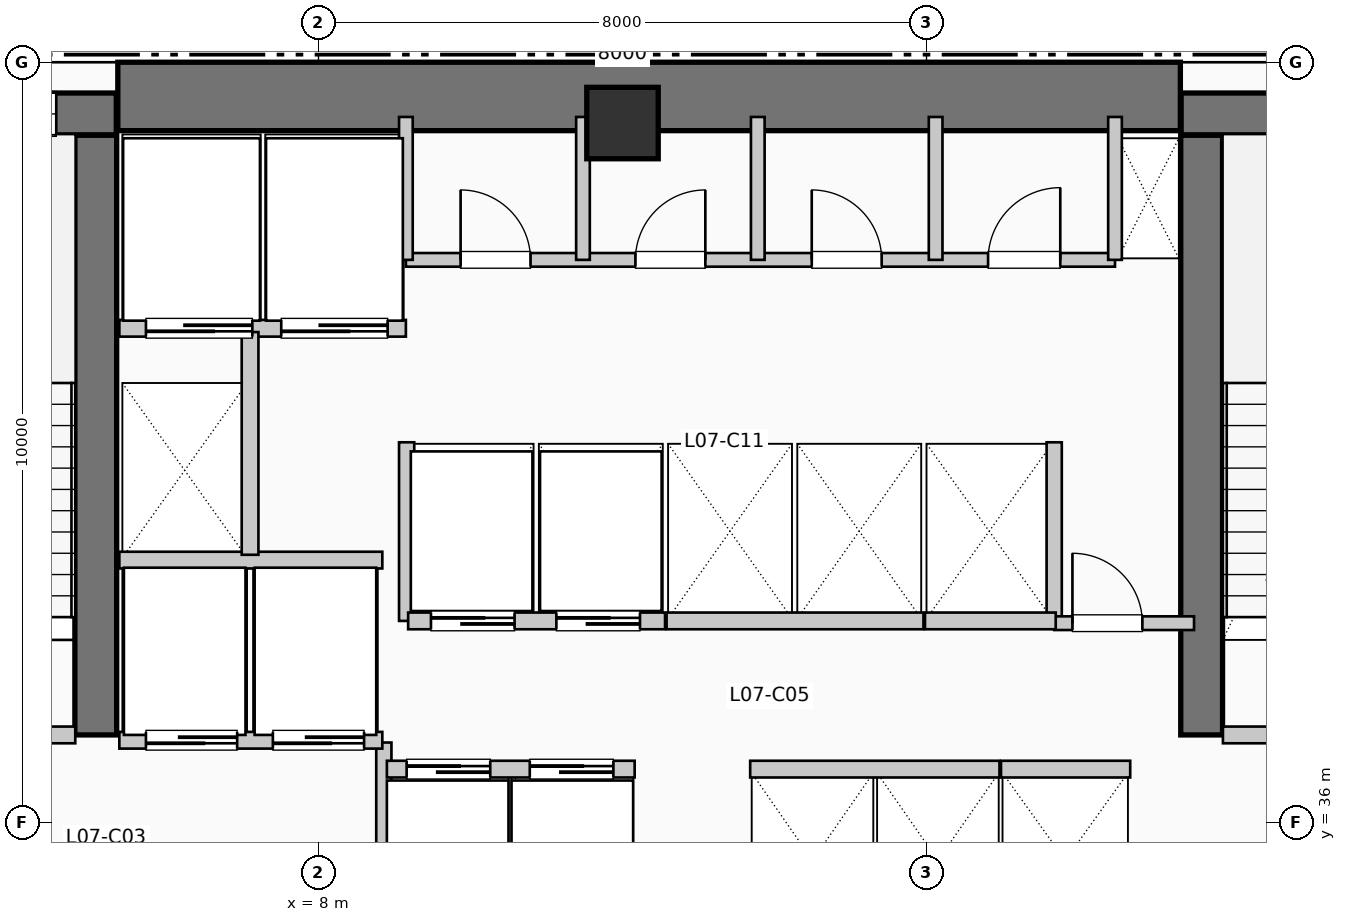
"""IFC4 building model, lengths in metres.
Left out: names, types, materials, properties, quantities, classifications, styles, units other than length and angle.
Written with IfcOpenShell. Run it as: python <this file> out.ifc"""

import sys

from ifc_helpers import new_model, si_unit, direction, frame, frame_2d, origin, origin_2d, place, context, subcontext, project, spatial, rectangle, extrude, element, fill, save


model = new_model("IFC4")
c1 = context("Model", 3, precision=1e-05, world=origin(), true_north=direction((0.0, 1.0)))
c2 = subcontext(c1, "Body", "Model", "MODEL_VIEW")
j1 = project(units=[si_unit("LENGTHUNIT", "METRE"), si_unit("PLANEANGLEUNIT", "RADIAN")], contexts=[c1])
p1 = place(None, origin())
s1 = spatial("IfcSite", under=j1, at=p1, CompositionType="ELEMENT")
p2 = place(p1, origin())
s2 = spatial("IfcBuilding", under=s1, at=p2, CompositionType="ELEMENT")
p3 = place(p2, frame((0.0, 0.0, 34.32)))
s3 = spatial("IfcBuildingStorey", under=s2, at=p3, CompositionType="ELEMENT", Elevation=34.32)
p4 = place(p3, frame((5.36, 45.55, 0.0), z_axis=(0.0, 0.0, 1.0), x_axis=(1.0, 0.0, 0.0)))
e1 = element("IfcWall", 1, at=p4, inside=s3, PredefinedType="SHEAR", context=c2, shape_type="SweptSolid", body=[
    extrude(rectangle(XDim=13.98, YDim=0.9, at=frame_2d((6.99, 0.0))), origin(), (0.0, 0.0, 1.0), 3.96),
])
p5 = place(p3, frame((5.07, 37.15, 0.0), z_axis=(0.0, 0.0, 1.0), x_axis=(0.0, 1.0, 0.0)))
e2 = element("IfcWall", 2, at=p5, inside=s3, PredefinedType="SHEAR", context=c2, shape_type="SweptSolid", body=[
    extrude(rectangle(XDim=7.89, YDim=0.55, at=frame_2d((3.945, 0.0))), origin(), (0.0, 0.0, 1.0), 3.96),
])
p6 = place(p3, frame((1.1, 45.32, 0.0), z_axis=(0.0, 0.0, 1.0), x_axis=(1.0, 0.0, 0.0)))
e3 = element("IfcWall", 3, at=p6, inside=s3, PredefinedType="SHEAR", context=c2, shape_type="SweptSolid", body=[
    extrude(rectangle(XDim=4.24, YDim=0.55, at=frame_2d((2.12, 0.0))), origin(), (0.0, 0.0, 1.0), 3.96),
])
p7 = place(p6, frame((2.05, 0.0, 1.05)))
e4 = element("IfcOpeningElement", 4, at=p7, cuts=e3, PredefinedType="OPENING", context=c2, shape_type="SweptSolid", body=[
    extrude(rectangle(XDim=1.4, YDim=1.8, at=frame_2d((0.7, 0.9))), frame((0.0, 0.285, 0.0), z_axis=(0.0, -1.0, 0.0), x_axis=(1.0, 0.0, 0.0)), (0.0, 0.0, 1.0), 0.57),
])
p8 = place(p3, frame((19.62, 37.15, 0.0), z_axis=(0.0, 0.0, 1.0), x_axis=(0.0, 1.0, 0.0)))
e5 = element("IfcWall", 5, at=p8, inside=s3, PredefinedType="SHEAR", context=c2, shape_type="SweptSolid", body=[
    extrude(rectangle(XDim=7.89, YDim=0.55, at=frame_2d((3.945, 0.0))), origin(), (0.0, 0.0, 1.0), 3.96),
])
p9 = place(p3, frame((19.35, 45.32, 0.0), z_axis=(0.0, 0.0, 1.0), x_axis=(1.0, 0.0, 0.0)))
e6 = element("IfcWall", 6, at=p9, inside=s3, PredefinedType="SHEAR", context=c2, shape_type="SweptSolid", body=[
    extrude(rectangle(XDim=3.69, YDim=0.55, at=frame_2d((1.845, 0.0))), origin(), (0.0, 0.0, 1.0), 3.96),
])
p10 = place(p9, frame((1.15, 0.0, 1.05)))
e7 = element("IfcOpeningElement", 7, at=p10, cuts=e6, PredefinedType="OPENING", context=c2, shape_type="SweptSolid", body=[
    extrude(rectangle(XDim=1.4, YDim=1.8, at=frame_2d((0.7, 0.9))), frame((0.0, 0.285, 0.0), z_axis=(0.0, -1.0, 0.0), x_axis=(1.0, 0.0, 0.0)), (0.0, 0.0, 1.0), 0.57),
])
p11 = place(p3, frame((12.0, 45.2, 0.0), z_axis=(0.0, 0.0, 1.0), x_axis=(1.0, 0.0, 0.0)))
e8 = element("IfcColumn", 8, at=p11, inside=s3, PredefinedType="COLUMN", context=c2, shape_type="SweptSolid", body=[
    extrude(rectangle(XDim=0.94, YDim=0.94, at=origin_2d()), origin(), (0.0, 0.0, 1.0), 3.96),
])
p12 = place(p3, frame((1.65, 37.15, 0.0), z_axis=(0.0, 0.0, 1.0), x_axis=(1.0, 0.0, 0.0)))
e9 = element("IfcWall", 9, at=p12, inside=s3, PredefinedType="PARTITIONING", context=c2, shape_type="SweptSolid", body=[
    extrude(rectangle(XDim=3.15, YDim=0.22, at=frame_2d((1.575, 0.0))), origin(), (0.0, 0.0, 1.0), 3.71),
])
p13 = place(p12, frame((2.05, 0.0, 0.0), z_axis=(0.0, 0.0, 1.0), x_axis=(-1.0, 0.0, 0.0)))
e10 = element("IfcOpeningElement", 10, at=p13, cuts=e9, PredefinedType="OPENING", context=c2, shape_type="SweptSolid", body=[
    extrude(rectangle(XDim=1.05, YDim=2.15, at=frame_2d((0.525, 1.075))), frame((0.0, 0.12, 0.0), z_axis=(0.0, -1.0, 0.0), x_axis=(1.0, 0.0, 0.0)), (0.0, 0.0, 1.0), 0.24),
])
p14 = place(p3, frame((8.86, 34.55, 0.0), z_axis=(0.0, 0.0, 1.0), x_axis=(0.0, 1.0, 0.0)))
e11 = element("IfcWall", 11, at=p14, inside=s3, PredefinedType="PARTITIONING", context=c2, shape_type="SweptSolid", body=[
    extrude(rectangle(XDim=2.5, YDim=0.2, at=frame_2d((1.25, 0.0))), origin(), (0.0, 0.0, 1.0), 3.71),
])
p15 = place(p3, frame((19.9, 37.15, 0.0), z_axis=(0.0, 0.0, 1.0), x_axis=(1.0, 0.0, 0.0)))
e12 = element("IfcWall", 12, at=p15, inside=s3, PredefinedType="PARTITIONING", context=c2, shape_type="SweptSolid", body=[
    extrude(rectangle(XDim=3.15, YDim=0.22, at=frame_2d((1.575, 0.0))), origin(), (0.0, 0.0, 1.0), 3.71),
])
p16 = place(p15, frame((2.05, 0.0, 0.0), z_axis=(0.0, 0.0, 1.0), x_axis=(-1.0, 0.0, 0.0)))
e13 = element("IfcOpeningElement", 13, at=p16, cuts=e12, PredefinedType="OPENING", context=c2, shape_type="SweptSolid", body=[
    extrude(rectangle(XDim=1.05, YDim=2.15, at=frame_2d((0.525, 1.075))), frame((0.0, 0.12, 0.0), z_axis=(0.0, -1.0, 0.0), x_axis=(1.0, 0.0, 0.0)), (0.0, 0.0, 1.0), 0.24),
])
p17 = place(p3, frame((5.38, 37.08, 0.0), z_axis=(0.0, 0.0, 1.0), x_axis=(1.0, 0.0, 0.0)))
e14 = element("IfcWall", 14, at=p17, inside=s3, PredefinedType="PARTITIONING", context=c2, shape_type="SweptSolid", body=[
    extrude(rectangle(XDim=3.46, YDim=0.22, at=frame_2d((1.73, 0.0))), origin(), (0.0, 0.0, 1.0), 3.71),
])
p18 = place(p17, frame((1.55, 0.0, 0.0), z_axis=(0.0, 0.0, 1.0), x_axis=(-1.0, 0.0, 0.0)))
e15 = element("IfcOpeningElement", 15, at=p18, cuts=e14, PredefinedType="OPENING", context=c2, shape_type="SweptSolid", body=[
    extrude(rectangle(XDim=1.2, YDim=2.2, at=frame_2d((0.6, 1.1))), frame((0.0, 0.12, 0.0), z_axis=(0.0, -1.0, 0.0), x_axis=(1.0, 0.0, 0.0)), (0.0, 0.0, 1.0), 0.24),
])
p19 = place(p17, frame((3.22, 0.0, 0.0), z_axis=(0.0, 0.0, 1.0), x_axis=(-1.0, 0.0, 0.0)))
e16 = element("IfcOpeningElement", 16, at=p19, cuts=e14, PredefinedType="OPENING", context=c2, shape_type="SweptSolid", body=[
    extrude(rectangle(XDim=1.2, YDim=2.2, at=frame_2d((0.6, 1.1))), frame((0.0, 0.12, 0.0), z_axis=(0.0, -1.0, 0.0), x_axis=(1.0, 0.0, 0.0)), (0.0, 0.0, 1.0), 0.24),
])
p20 = place(p3, frame((5.38, 39.45, 0.0), z_axis=(0.0, 0.0, 1.0), x_axis=(1.0, 0.0, 0.0)))
e17 = element("IfcWall", 17, at=p20, inside=s3, PredefinedType="PARTITIONING", context=c2, shape_type="SweptSolid", body=[
    extrude(rectangle(XDim=3.46, YDim=0.22, at=frame_2d((1.73, 0.0))), origin(), (0.0, 0.0, 1.0), 3.71),
])
p21 = place(p3, frame((5.38, 42.5, 0.0), z_axis=(0.0, 0.0, 1.0), x_axis=(1.0, 0.0, 0.0)))
e18 = element("IfcWall", 18, at=p21, inside=s3, PredefinedType="PARTITIONING", context=c2, shape_type="SweptSolid", body=[
    extrude(rectangle(XDim=3.77, YDim=0.22, at=frame_2d((1.885, 0.0))), origin(), (0.0, 0.0, 1.0), 3.71),
])
p22 = place(p21, frame((1.75, 0.0, 0.0), z_axis=(0.0, 0.0, 1.0), x_axis=(-1.0, 0.0, 0.0)))
e19 = element("IfcOpeningElement", 19, at=p22, cuts=e18, PredefinedType="OPENING", context=c2, shape_type="SweptSolid", body=[
    extrude(rectangle(XDim=1.4, YDim=2.2, at=frame_2d((0.7, 1.1))), frame((0.0, 0.12, 0.0), z_axis=(0.0, -1.0, 0.0), x_axis=(1.0, 0.0, 0.0)), (0.0, 0.0, 1.0), 0.24),
])
p23 = place(p21, frame((3.53, 0.0, 0.0), z_axis=(0.0, 0.0, 1.0), x_axis=(-1.0, 0.0, 0.0)))
e20 = element("IfcOpeningElement", 20, at=p23, cuts=e18, PredefinedType="OPENING", context=c2, shape_type="SweptSolid", body=[
    extrude(rectangle(XDim=1.4, YDim=2.2, at=frame_2d((0.7, 1.1))), frame((0.0, 0.12, 0.0), z_axis=(0.0, -1.0, 0.0), x_axis=(1.0, 0.0, 0.0)), (0.0, 0.0, 1.0), 0.24),
])
p24 = place(p3, frame((7.1, 39.52, 0.0), z_axis=(0.0, 0.0, 1.0), x_axis=(0.0, 1.0, 0.0)))
e21 = element("IfcWall", 21, at=p24, inside=s3, PredefinedType="PARTITIONING", context=c2, shape_type="SweptSolid", body=[
    extrude(rectangle(XDim=2.93, YDim=0.22, at=frame_2d((1.465, 0.0))), origin(), (0.0, 0.0, 1.0), 3.71),
])
for number, where, z_axis, x_axis in (
    (22, (9.16, 38.65, 0.0), (0.0, 0.0, 1.0), (0.0, 1.0, 0.0)),
    (23, (17.68, 38.65, 0.0), (0.0, 0.0, 1.0), (0.0, 1.0, 0.0)),
):
    element("IfcWall", number, at=place(p3, frame(where, z_axis=z_axis, x_axis=x_axis)), inside=s3, PredefinedType="PARTITIONING", context=c2, shape_type="SweptSolid", body=[
        extrude(rectangle(XDim=2.35, YDim=0.2, at=frame_2d((1.175, 0.0))), origin(), (0.0, 0.0, 1.0), 3.71),
    ])
p25 = place(p3, frame((17.68, 38.62, 0.0), z_axis=(0.0, 0.0, 1.0), x_axis=(1.0, 0.0, 0.0)))
e24 = element("IfcWall", 24, at=p25, inside=s3, PredefinedType="PARTITIONING", context=c2, shape_type="SweptSolid", body=[
    extrude(rectangle(XDim=1.84, YDim=0.18, at=frame_2d((0.92, 0.0))), origin(), (0.0, 0.0, 1.0), 3.71),
])
p26 = place(p25, frame((0.24, 0.0, 0.0)))
e25 = element("IfcOpeningElement", 25, at=p26, cuts=e24, PredefinedType="OPENING", context=c2, shape_type="SweptSolid", body=[
    extrude(rectangle(XDim=0.92, YDim=2.1, at=frame_2d((0.46, 1.05))), frame((0.0, 0.1, 0.0), z_axis=(0.0, -1.0, 0.0), x_axis=(1.0, 0.0, 0.0)), (0.0, 0.0, 1.0), 0.2),
])
p27 = place(p3, frame((8.9, 36.7, 0.0), z_axis=(0.0, 0.0, 1.0), x_axis=(1.0, 0.0, 0.0)))
e26 = element("IfcWall", 26, at=p27, inside=s3, PredefinedType="PARTITIONING", context=c2, shape_type="SweptSolid", body=[
    extrude(rectangle(XDim=3.26, YDim=0.22, at=frame_2d((1.63, 0.0))), origin(), (0.0, 0.0, 1.0), 3.71),
])
p28 = place(p27, frame((0.26, 0.0, 0.0)))
e27 = element("IfcOpeningElement", 27, at=p28, cuts=e26, PredefinedType="OPENING", context=c2, shape_type="SweptSolid", body=[
    extrude(rectangle(XDim=1.1, YDim=2.2, at=frame_2d((0.55, 1.1))), frame((0.0, 0.12, 0.0), z_axis=(0.0, -1.0, 0.0), x_axis=(1.0, 0.0, 0.0)), (0.0, 0.0, 1.0), 0.24),
])
p29 = place(p27, frame((1.88, 0.0, 0.0)))
e28 = element("IfcOpeningElement", 28, at=p29, cuts=e26, PredefinedType="OPENING", context=c2, shape_type="SweptSolid", body=[
    extrude(rectangle(XDim=1.1, YDim=2.2, at=frame_2d((0.55, 1.1))), frame((0.0, 0.12, 0.0), z_axis=(0.0, -1.0, 0.0), x_axis=(1.0, 0.0, 0.0)), (0.0, 0.0, 1.0), 0.24),
])
p30 = place(p3, frame((9.18, 38.65, 0.0), z_axis=(0.0, 0.0, 1.0), x_axis=(1.0, 0.0, 0.0)))
e29 = element("IfcWall", 29, at=p30, inside=s3, PredefinedType="PARTITIONING", context=c2, shape_type="SweptSolid", body=[
    extrude(rectangle(XDim=3.38, YDim=0.22, at=frame_2d((1.69, 0.0))), origin(), (0.0, 0.0, 1.0), 3.71),
])
p31 = place(p30, frame((0.3, 0.0, 0.0)))
e30 = element("IfcOpeningElement", 30, at=p31, cuts=e29, PredefinedType="OPENING", context=c2, shape_type="SweptSolid", body=[
    extrude(rectangle(XDim=1.1, YDim=2.2, at=frame_2d((0.55, 1.1))), frame((0.0, 0.12, 0.0), z_axis=(0.0, -1.0, 0.0), x_axis=(1.0, 0.0, 0.0)), (0.0, 0.0, 1.0), 0.24),
])
p32 = place(p30, frame((1.95, 0.0, 0.0)))
e31 = element("IfcOpeningElement", 31, at=p32, cuts=e29, PredefinedType="OPENING", context=c2, shape_type="SweptSolid", body=[
    extrude(rectangle(XDim=1.1, YDim=2.2, at=frame_2d((0.55, 1.1))), frame((0.0, 0.12, 0.0), z_axis=(0.0, -1.0, 0.0), x_axis=(1.0, 0.0, 0.0)), (0.0, 0.0, 1.0), 0.24),
])
p33 = place(p3, frame((13.68, 36.7, 0.0), z_axis=(0.0, 0.0, 1.0), x_axis=(1.0, 0.0, 0.0)))
e32 = element("IfcWall", 32, at=p33, inside=s3, PredefinedType="PARTITIONING", context=c2, shape_type="SweptSolid", body=[
    extrude(rectangle(XDim=3.28, YDim=0.22, at=frame_2d((1.64, 0.0))), origin(), (0.0, 0.0, 1.0), 3.71),
])
p34 = place(p3, frame((12.58, 38.65, 0.0), z_axis=(0.0, 0.0, 1.0), x_axis=(1.0, 0.0, 0.0)))
e33 = element("IfcWall", 33, at=p34, inside=s3, PredefinedType="PARTITIONING", context=c2, shape_type="SweptSolid", body=[
    extrude(rectangle(XDim=3.38, YDim=0.22, at=frame_2d((1.69, 0.0))), origin(), (0.0, 0.0, 1.0), 3.71),
])
p35 = place(p3, frame((16.98, 36.7, 0.0), z_axis=(0.0, 0.0, 1.0), x_axis=(1.0, 0.0, 0.0)))
e34 = element("IfcWall", 34, at=p35, inside=s3, PredefinedType="PARTITIONING", context=c2, shape_type="SweptSolid", body=[
    extrude(rectangle(XDim=1.7, YDim=0.22, at=frame_2d((0.85, 0.0))), origin(), (0.0, 0.0, 1.0), 3.71),
])
p36 = place(p3, frame((15.98, 38.65, 0.0), z_axis=(0.0, 0.0, 1.0), x_axis=(1.0, 0.0, 0.0)))
e35 = element("IfcWall", 35, at=p36, inside=s3, PredefinedType="PARTITIONING", context=c2, shape_type="SweptSolid", body=[
    extrude(rectangle(XDim=1.72, YDim=0.22, at=frame_2d((0.86, 0.0))), origin(), (0.0, 0.0, 1.0), 3.71),
])
p37 = place(p3, frame((9.15, 43.4, 0.0), z_axis=(0.0, 0.0, 1.0), x_axis=(1.0, 0.0, 0.0)))
e36 = element("IfcWall", 36, at=p37, inside=s3, PredefinedType="PLUMBINGWALL", context=c2, shape_type="SweptSolid", body=[
    extrude(rectangle(XDim=9.33, YDim=0.18, at=frame_2d((4.665, 0.0))), origin(), (0.0, 0.0, 1.0), 3.71),
])
p38 = place(p37, frame((0.72, 0.0, 0.0)))
e37 = element("IfcOpeningElement", 37, at=p38, cuts=e36, PredefinedType="OPENING", context=c2, shape_type="SweptSolid", body=[
    extrude(rectangle(XDim=0.92, YDim=2.1, at=frame_2d((0.46, 1.05))), frame((0.0, 0.1, 0.0), z_axis=(0.0, -1.0, 0.0), x_axis=(1.0, 0.0, 0.0)), (0.0, 0.0, 1.0), 0.2),
])
p39 = place(p37, frame((3.02, 0.0, 0.0)))
e38 = element("IfcOpeningElement", 38, at=p39, cuts=e36, PredefinedType="OPENING", context=c2, shape_type="SweptSolid", body=[
    extrude(rectangle(XDim=0.92, YDim=2.1, at=frame_2d((0.46, 1.05))), frame((0.0, 0.1, 0.0), z_axis=(0.0, -1.0, 0.0), x_axis=(1.0, 0.0, 0.0)), (0.0, 0.0, 1.0), 0.2),
])
p40 = place(p37, frame((5.34, 0.0, 0.0)))
e39 = element("IfcOpeningElement", 39, at=p40, cuts=e36, PredefinedType="OPENING", context=c2, shape_type="SweptSolid", body=[
    extrude(rectangle(XDim=0.92, YDim=2.1, at=frame_2d((0.46, 1.05))), frame((0.0, 0.1, 0.0), z_axis=(0.0, -1.0, 0.0), x_axis=(1.0, 0.0, 0.0)), (0.0, 0.0, 1.0), 0.2),
])
p41 = place(p37, frame((7.66, 0.0, 0.0)))
e40 = element("IfcOpeningElement", 40, at=p41, cuts=e36, PredefinedType="OPENING", context=c2, shape_type="SweptSolid", body=[
    extrude(rectangle(XDim=0.95, YDim=2.1, at=frame_2d((0.475, 1.05))), frame((0.0, 0.1, 0.0), z_axis=(0.0, -1.0, 0.0), x_axis=(1.0, 0.0, 0.0)), (0.0, 0.0, 1.0), 0.2),
])
for number, where, z_axis, x_axis in (
    (41, (9.15, 43.4, 0.0), (0.0, 0.0, 1.0), (0.0, 1.0, 0.0)),
    (42, (18.48, 43.4, 0.0), (0.0, 0.0, 1.0), (0.0, 1.0, 0.0)),
    (43, (11.48, 43.4, 0.0), (0.0, 0.0, 1.0), (0.0, 1.0, 0.0)),
    (44, (13.78, 43.4, 0.0), (0.0, 0.0, 1.0), (0.0, 1.0, 0.0)),
    (45, (16.12, 43.4, 0.0), (0.0, 0.0, 1.0), (0.0, 1.0, 0.0)),
):
    element("IfcWall", number, at=place(p3, frame(where, z_axis=z_axis, x_axis=x_axis)), inside=s3, PredefinedType="PLUMBINGWALL", context=c2, shape_type="SweptSolid", body=[
        extrude(rectangle(XDim=1.88, YDim=0.18, at=frame_2d((0.94, 0.0))), origin(), (0.0, 0.0, 1.0), 3.71),
    ])
p42 = place(p7, origin())
e46 = element("IfcWindow", 46, at=p42, inside=s3, PartitioningType="SINGLE_PANEL", PredefinedType="WINDOW", context=c2, shape_type="SweptSolid", body=[
    extrude(rectangle(XDim=1.4, YDim=1.8, at=frame_2d((0.7, 0.9))), frame((0.0, 0.03, 0.0), z_axis=(0.0, -1.0, 0.0), x_axis=(1.0, 0.0, 0.0)), (0.0, 0.0, 1.0), 0.06),
])
fill(e4, e46)
p43 = place(p18, origin())
e47 = element("IfcDoor", 47, at=p43, inside=s3, OperationType="SLIDING_TO_RIGHT", PredefinedType="DOOR", context=c2, shape_type="SweptSolid", body=[
    extrude(rectangle(XDim=1.2, YDim=2.2, at=frame_2d((0.6, 1.1))), frame((0.0, 0.025, 0.0), z_axis=(0.0, -1.0, 0.0), x_axis=(1.0, 0.0, 0.0)), (0.0, 0.0, 1.0), 0.05),
])
fill(e15, e47)
p44 = place(p19, origin())
e48 = element("IfcDoor", 48, at=p44, inside=s3, OperationType="SLIDING_TO_RIGHT", PredefinedType="DOOR", context=c2, shape_type="SweptSolid", body=[
    extrude(rectangle(XDim=1.2, YDim=2.2, at=frame_2d((0.6, 1.1))), frame((0.0, 0.025, 0.0), z_axis=(0.0, -1.0, 0.0), x_axis=(1.0, 0.0, 0.0)), (0.0, 0.0, 1.0), 0.05),
])
fill(e16, e48)
p45 = place(p22, origin())
e49 = element("IfcDoor", 49, at=p45, inside=s3, OperationType="SLIDING_TO_LEFT", PredefinedType="DOOR", context=c2, shape_type="SweptSolid", body=[
    extrude(rectangle(XDim=1.4, YDim=2.2, at=frame_2d((0.7, 1.1))), frame((0.0, 0.025, 0.0), z_axis=(0.0, -1.0, 0.0), x_axis=(1.0, 0.0, 0.0)), (0.0, 0.0, 1.0), 0.05),
])
fill(e19, e49)
p46 = place(p23, origin())
e50 = element("IfcDoor", 50, at=p46, inside=s3, OperationType="SLIDING_TO_LEFT", PredefinedType="DOOR", context=c2, shape_type="SweptSolid", body=[
    extrude(rectangle(XDim=1.4, YDim=2.2, at=frame_2d((0.7, 1.1))), frame((0.0, 0.025, 0.0), z_axis=(0.0, -1.0, 0.0), x_axis=(1.0, 0.0, 0.0)), (0.0, 0.0, 1.0), 0.05),
])
fill(e20, e50)
p47 = place(p26, origin())
e51 = element("IfcDoor", 51, at=p47, inside=s3, OperationType="SINGLE_SWING_LEFT", PredefinedType="DOOR", context=c2, shape_type="SweptSolid", body=[
    extrude(rectangle(XDim=0.92, YDim=2.1, at=frame_2d((0.46, 1.05))), frame((0.0, 0.025, 0.0), z_axis=(0.0, -1.0, 0.0), x_axis=(1.0, 0.0, 0.0)), (0.0, 0.0, 1.0), 0.05),
])
fill(e25, e51)
p48 = place(p28, origin())
e52 = element("IfcDoor", 52, at=p48, inside=s3, OperationType="SLIDING_TO_LEFT", PredefinedType="DOOR", context=c2, shape_type="SweptSolid", body=[
    extrude(rectangle(XDim=1.1, YDim=2.2, at=frame_2d((0.55, 1.1))), frame((0.0, 0.025, 0.0), z_axis=(0.0, -1.0, 0.0), x_axis=(1.0, 0.0, 0.0)), (0.0, 0.0, 1.0), 0.05),
])
fill(e27, e52)
p49 = place(p29, origin())
e53 = element("IfcDoor", 53, at=p49, inside=s3, OperationType="SLIDING_TO_LEFT", PredefinedType="DOOR", context=c2, shape_type="SweptSolid", body=[
    extrude(rectangle(XDim=1.1, YDim=2.2, at=frame_2d((0.55, 1.1))), frame((0.0, 0.025, 0.0), z_axis=(0.0, -1.0, 0.0), x_axis=(1.0, 0.0, 0.0)), (0.0, 0.0, 1.0), 0.05),
])
fill(e28, e53)
p50 = place(p31, origin())
e54 = element("IfcDoor", 54, at=p50, inside=s3, OperationType="SLIDING_TO_LEFT", PredefinedType="DOOR", context=c2, shape_type="SweptSolid", body=[
    extrude(rectangle(XDim=1.1, YDim=2.2, at=frame_2d((0.55, 1.1))), frame((0.0, 0.025, 0.0), z_axis=(0.0, -1.0, 0.0), x_axis=(1.0, 0.0, 0.0)), (0.0, 0.0, 1.0), 0.05),
])
fill(e30, e54)
p51 = place(p32, origin())
e55 = element("IfcDoor", 55, at=p51, inside=s3, OperationType="SLIDING_TO_LEFT", PredefinedType="DOOR", context=c2, shape_type="SweptSolid", body=[
    extrude(rectangle(XDim=1.1, YDim=2.2, at=frame_2d((0.55, 1.1))), frame((0.0, 0.025, 0.0), z_axis=(0.0, -1.0, 0.0), x_axis=(1.0, 0.0, 0.0)), (0.0, 0.0, 1.0), 0.05),
])
fill(e31, e55)
p52 = place(p38, origin())
e56 = element("IfcDoor", 56, at=p52, inside=s3, OperationType="SINGLE_SWING_LEFT", PredefinedType="DOOR", context=c2, shape_type="SweptSolid", body=[
    extrude(rectangle(XDim=0.92, YDim=2.1, at=frame_2d((0.46, 1.05))), frame((0.0, 0.025, 0.0), z_axis=(0.0, -1.0, 0.0), x_axis=(1.0, 0.0, 0.0)), (0.0, 0.0, 1.0), 0.05),
])
fill(e37, e56)
p53 = place(p39, origin())
e57 = element("IfcDoor", 57, at=p53, inside=s3, OperationType="SINGLE_SWING_RIGHT", PredefinedType="DOOR", context=c2, shape_type="SweptSolid", body=[
    extrude(rectangle(XDim=0.92, YDim=2.1, at=frame_2d((0.46, 1.05))), frame((0.0, 0.025, 0.0), z_axis=(0.0, -1.0, 0.0), x_axis=(1.0, 0.0, 0.0)), (0.0, 0.0, 1.0), 0.05),
])
fill(e38, e57)
p54 = place(p40, origin())
e58 = element("IfcDoor", 58, at=p54, inside=s3, OperationType="SINGLE_SWING_LEFT", PredefinedType="DOOR", context=c2, shape_type="SweptSolid", body=[
    extrude(rectangle(XDim=0.92, YDim=2.1, at=frame_2d((0.46, 1.05))), frame((0.0, 0.025, 0.0), z_axis=(0.0, -1.0, 0.0), x_axis=(1.0, 0.0, 0.0)), (0.0, 0.0, 1.0), 0.05),
])
fill(e39, e58)
p55 = place(p41, origin())
e59 = element("IfcDoor", 59, at=p55, inside=s3, OperationType="SINGLE_SWING_RIGHT", PredefinedType="DOOR", context=c2, shape_type="SweptSolid", body=[
    extrude(rectangle(XDim=0.95, YDim=2.1, at=frame_2d((0.475, 1.05))), frame((0.0, 0.025, 0.0), z_axis=(0.0, -1.0, 0.0), x_axis=(1.0, 0.0, 0.0)), (0.0, 0.0, 1.0), 0.05),
])
fill(e40, e59)
save(model, sys.argv[1])
